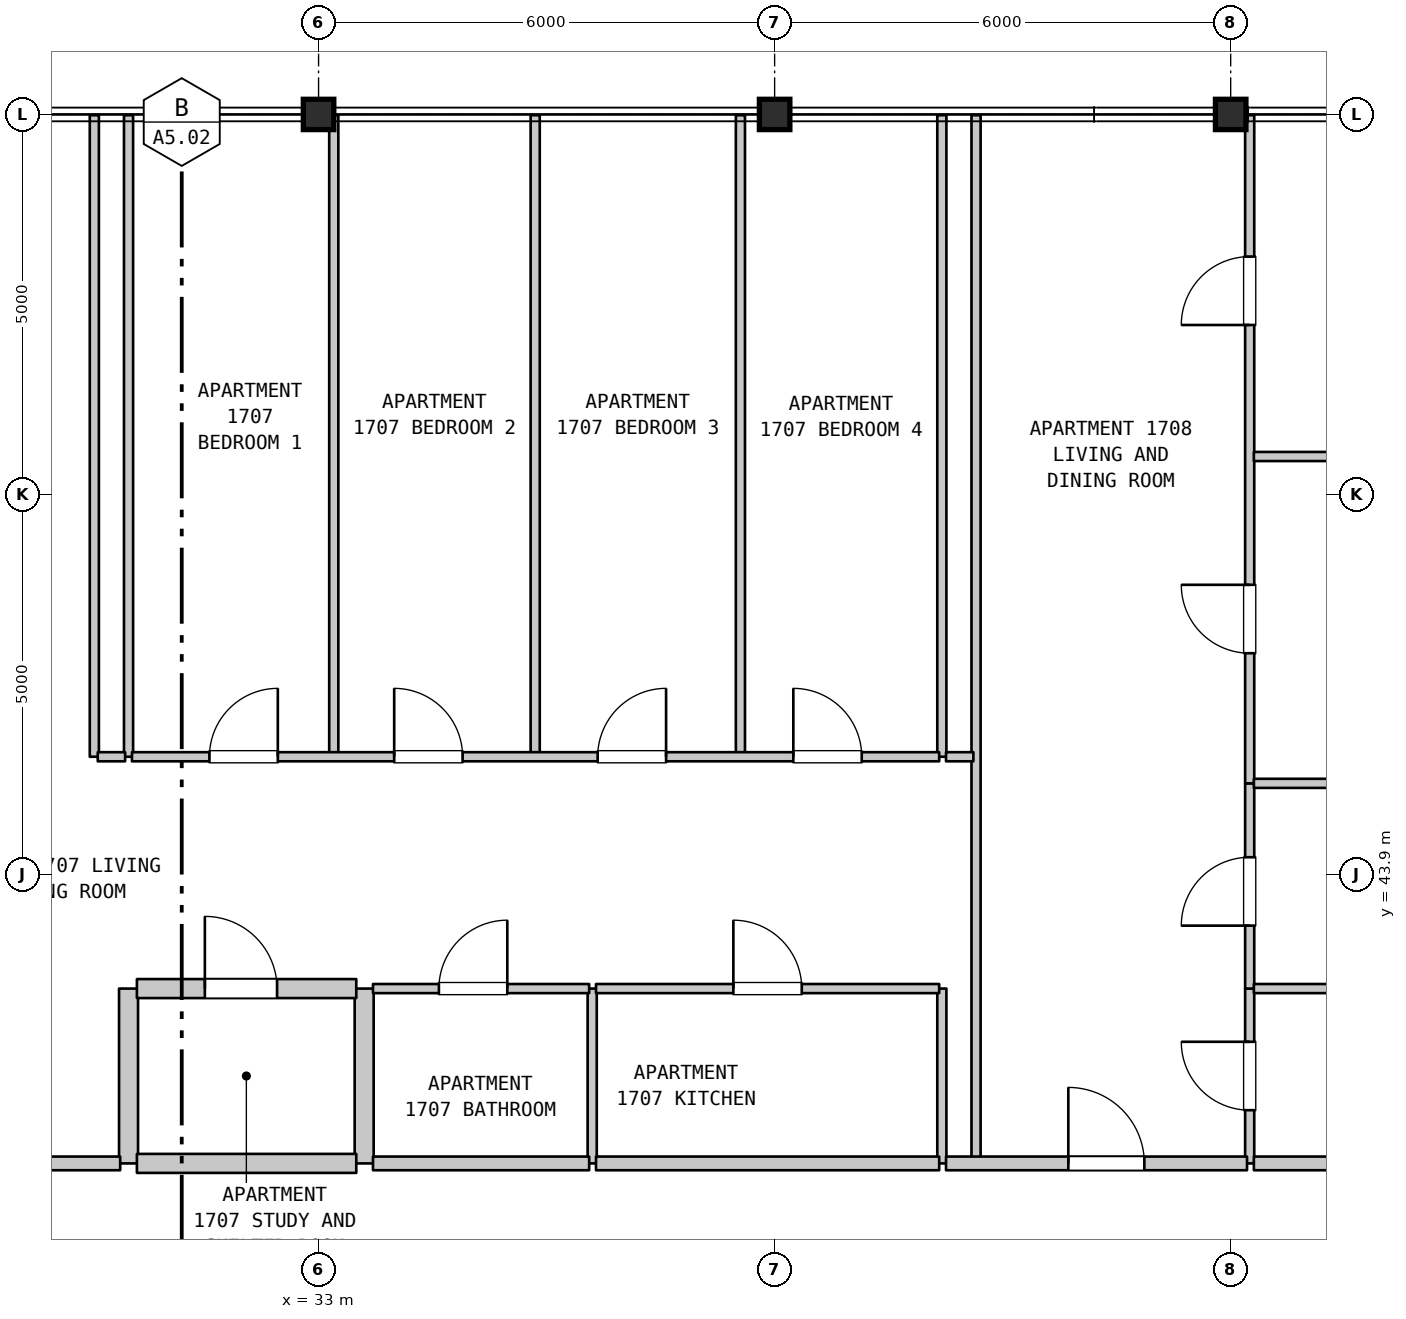
"""IFC4 building model, lengths in metres.
Left out: names, types, materials, properties, quantities, classifications, styles, units other than length and angle.
Written with IfcOpenShell. Run it as: python <this file> out.ifc"""

import sys

from ifc_helpers import new_model, si_unit, direction, frame, frame_2d, origin, origin_2d, place, context, subcontext, project, spatial, rectangle, i_section, extrude, element, fill, save


model = new_model("IFC4")
c1 = context("Model", 3, precision=1e-05, world=origin(), true_north=direction((0.0, 1.0)))
c2 = subcontext(c1, "Body", "Model", "MODEL_VIEW")
j1 = project(units=[si_unit("LENGTHUNIT", "METRE"), si_unit("PLANEANGLEUNIT", "RADIAN")], contexts=[c1])
p1 = place(None, origin())
s1 = spatial("IfcSite", under=j1, at=p1, CompositionType="ELEMENT")
p2 = place(p1, origin())
s2 = spatial("IfcBuilding", under=s1, at=p2, CompositionType="ELEMENT")
p3 = place(p2, frame((0.0, 0.0, 73.8)))
s3 = spatial("IfcBuildingStorey", under=s2, at=p3, CompositionType="ELEMENT", Elevation=73.8)
for number, where, z_axis, x_axis in (
    (1, (33.0, 53.9, 0.0), (0.0, 0.0, 1.0), (1.0, 0.0, 0.0)),
    (2, (39.0, 53.9, 0.0), (0.0, 0.0, 1.0), (1.0, 0.0, 0.0)),
    (3, (45.0, 53.9, 0.0), (0.0, 0.0, 1.0), (1.0, 0.0, 0.0)),
):
    element("IfcColumn", number, at=place(p3, frame(where, z_axis=z_axis, x_axis=x_axis)), inside=s3, PredefinedType="COLUMN", context=c2, shape_type="SweptSolid", body=[
        extrude(i_section(OverallWidth=0.401, OverallDepth=0.399, WebThickness=0.025, FlangeThickness=0.04, FilletRadius=0.015, at=origin_2d()), origin(), (0.0, 0.0, 1.0), 3.7),
    ])
p4 = place(p3, frame((30.05, 45.45, 0.0), z_axis=(0.0, 0.0, 1.0), x_axis=(0.0, 1.0, 0.0)))
e4 = element("IfcWall", 4, at=p4, inside=s3, PredefinedType="PARTITIONING", context=c2, shape_type="SweptSolid", body=[
    extrude(rectangle(XDim=8.44, YDim=0.12, at=frame_2d((4.22, 0.0))), origin(), (0.0, 0.0, 1.0), 3.385),
])
p5 = place(p3, frame((30.5, 40.1, 0.0), z_axis=(0.0, 0.0, 1.0), x_axis=(0.0, 1.0, 0.0)))
e5 = element("IfcWall", 5, at=p5, inside=s3, PredefinedType="STANDARD", context=c2, shape_type="SweptSolid", body=[
    extrude(rectangle(XDim=2.3, YDim=0.25, at=frame_2d((1.15, 0.0))), origin(), (0.0, 0.0, 1.0), 3.385),
])
for number, where, z_axis, x_axis in (
    (6, (30.5, 45.45, 0.0), (0.0, 0.0, 1.0), (0.0, 1.0, 0.0)),
    (7, (33.2, 45.45, 0.0), (0.0, 0.0, 1.0), (0.0, 1.0, 0.0)),
):
    element("IfcWall", number, at=place(p3, frame(where, z_axis=z_axis, x_axis=x_axis)), inside=s3, PredefinedType="PARTITIONING", context=c2, shape_type="SweptSolid", body=[
        extrude(rectangle(XDim=8.44, YDim=0.12, at=frame_2d((4.22, 0.0))), origin(), (0.0, 0.0, 1.0), 3.385),
    ])
p6 = place(p3, frame((33.6, 40.1, 0.0), z_axis=(0.0, 0.0, 1.0), x_axis=(0.0, 1.0, 0.0)))
e8 = element("IfcWall", 8, at=p6, inside=s3, PredefinedType="STANDARD", context=c2, shape_type="SweptSolid", body=[
    extrude(rectangle(XDim=2.3, YDim=0.25, at=frame_2d((1.15, 0.0))), origin(), (0.0, 0.0, 1.0), 3.385),
])
p7 = place(p3, frame((35.85, 45.45, 0.0), z_axis=(0.0, 0.0, 1.0), x_axis=(0.0, 1.0, 0.0)))
e9 = element("IfcWall", 9, at=p7, inside=s3, PredefinedType="PARTITIONING", context=c2, shape_type="SweptSolid", body=[
    extrude(rectangle(XDim=8.44, YDim=0.12, at=frame_2d((4.22, 0.0))), origin(), (0.0, 0.0, 1.0), 3.385),
])
p8 = place(p3, frame((36.6, 40.1, 0.0), z_axis=(0.0, 0.0, 1.0), x_axis=(0.0, 1.0, 0.0)))
e10 = element("IfcWall", 10, at=p8, inside=s3, PredefinedType="PARTITIONING", context=c2, shape_type="SweptSolid", body=[
    extrude(rectangle(XDim=2.3, YDim=0.12, at=frame_2d((1.15, 0.0))), origin(), (0.0, 0.0, 1.0), 3.385),
])
p9 = place(p3, frame((38.55, 45.45, 0.0), z_axis=(0.0, 0.0, 1.0), x_axis=(0.0, 1.0, 0.0)))
e11 = element("IfcWall", 11, at=p9, inside=s3, PredefinedType="PARTITIONING", context=c2, shape_type="SweptSolid", body=[
    extrude(rectangle(XDim=8.44, YDim=0.12, at=frame_2d((4.22, 0.0))), origin(), (0.0, 0.0, 1.0), 3.385),
])
p10 = place(p3, frame((41.2, 40.1, 0.0), z_axis=(0.0, 0.0, 1.0), x_axis=(0.0, 1.0, 0.0)))
e12 = element("IfcWall", 12, at=p10, inside=s3, PredefinedType="PARTITIONING", context=c2, shape_type="SweptSolid", body=[
    extrude(rectangle(XDim=2.3, YDim=0.12, at=frame_2d((1.15, 0.0))), origin(), (0.0, 0.0, 1.0), 3.385),
])
p11 = place(p3, frame((41.2, 45.45, 0.0), z_axis=(0.0, 0.0, 1.0), x_axis=(0.0, 1.0, 0.0)))
e13 = element("IfcWall", 13, at=p11, inside=s3, PredefinedType="PARTITIONING", context=c2, shape_type="SweptSolid", body=[
    extrude(rectangle(XDim=8.44, YDim=0.12, at=frame_2d((4.22, 0.0))), origin(), (0.0, 0.0, 1.0), 3.385),
])
p12 = place(p3, frame((41.65, 40.1, 0.0), z_axis=(0.0, 0.0, 1.0), x_axis=(0.0, 1.0, 0.0)))
e14 = element("IfcWall", 14, at=p12, inside=s3, PredefinedType="PARTITIONING", context=c2, shape_type="SweptSolid", body=[
    extrude(rectangle(XDim=13.79, YDim=0.12, at=frame_2d((6.895, 0.0))), origin(), (0.0, 0.0, 1.0), 3.385),
])
p13 = place(p3, frame((45.25, 40.1, 0.0), z_axis=(0.0, 0.0, 1.0), x_axis=(0.0, 1.0, 0.0)))
e15 = element("IfcWall", 15, at=p13, inside=s3, PredefinedType="PARTITIONING", context=c2, shape_type="SweptSolid", body=[
    extrude(rectangle(XDim=2.3, YDim=0.12, at=frame_2d((1.15, 0.0))), origin(), (0.0, 0.0, 1.0), 3.385),
])
p14 = place(p13, frame((0.7, 0.0, 0.0)))
e16 = element("IfcOpeningElement", 16, at=p14, cuts=e15, PredefinedType="OPENING", context=c2, shape_type="SweptSolid", body=[
    extrude(rectangle(XDim=0.9, YDim=2.15, at=frame_2d((0.45, 1.075))), frame((0.0, 0.07, 0.0), z_axis=(0.0, -1.0, 0.0), x_axis=(1.0, 0.0, 0.0)), (0.0, 0.0, 1.0), 0.14),
])
p15 = place(p3, frame((45.25, 42.4, 0.0), z_axis=(0.0, 0.0, 1.0), x_axis=(0.0, 1.0, 0.0)))
e17 = element("IfcWall", 17, at=p15, inside=s3, PredefinedType="PARTITIONING", context=c2, shape_type="SweptSolid", body=[
    extrude(rectangle(XDim=2.7, YDim=0.12, at=frame_2d((1.35, 0.0))), origin(), (0.0, 0.0, 1.0), 3.385),
])
p16 = place(p15, frame((0.828, 0.0, 0.0)))
e18 = element("IfcOpeningElement", 18, at=p16, cuts=e17, PredefinedType="OPENING", context=c2, shape_type="SweptSolid", body=[
    extrude(rectangle(XDim=0.9, YDim=2.1, at=frame_2d((0.45, 1.05))), frame((0.0, 0.07, 0.0), z_axis=(0.0, -1.0, 0.0), x_axis=(1.0, 0.0, 0.0)), (0.0, 0.0, 1.0), 0.14),
])
p17 = place(p3, frame((45.25, 45.1, 0.0), z_axis=(0.0, 0.0, 1.0), x_axis=(0.0, 1.0, 0.0)))
e19 = element("IfcWall", 19, at=p17, inside=s3, PredefinedType="PARTITIONING", context=c2, shape_type="SweptSolid", body=[
    extrude(rectangle(XDim=8.79, YDim=0.12, at=frame_2d((4.395, 0.0))), origin(), (0.0, 0.0, 1.0), 3.385),
])
p18 = place(p17, frame((1.712, 0.0, 0.0)))
e20 = element("IfcOpeningElement", 20, at=p18, cuts=e19, PredefinedType="OPENING", context=c2, shape_type="SweptSolid", body=[
    extrude(rectangle(XDim=0.9, YDim=2.15, at=frame_2d((0.45, 1.075))), frame((0.0, 0.07, 0.0), z_axis=(0.0, -1.0, 0.0), x_axis=(1.0, 0.0, 0.0)), (0.0, 0.0, 1.0), 0.14),
])
p19 = place(p17, frame((6.03, 0.0, 0.0)))
e21 = element("IfcOpeningElement", 21, at=p19, cuts=e19, PredefinedType="OPENING", context=c2, shape_type="SweptSolid", body=[
    extrude(rectangle(XDim=0.9, YDim=2.15, at=frame_2d((0.45, 1.075))), frame((0.0, 0.07, 0.0), z_axis=(0.0, -1.0, 0.0), x_axis=(1.0, 0.0, 0.0)), (0.0, 0.0, 1.0), 0.14),
])
p20 = place(p3, frame((20.045, 40.1, 0.0), z_axis=(0.0, 0.0, 1.0), x_axis=(1.0, 0.0, 0.0)))
e22 = element("IfcWall", 22, at=p20, inside=s3, PredefinedType="STANDARD", context=c2, shape_type="SweptSolid", body=[
    extrude(rectangle(XDim=10.345, YDim=0.18, at=frame_2d((5.172, 0.0))), origin(), (0.0, 0.0, 1.0), 3.385),
])
p21 = place(p20, frame((2.035, 0.0, 0.0)))
e23 = element("IfcOpeningElement", 23, at=p21, cuts=e22, PredefinedType="OPENING", context=c2, shape_type="SweptSolid", body=[
    extrude(rectangle(XDim=1.0, YDim=2.15, at=frame_2d((0.5, 1.075))), frame((0.0, 0.1, 0.0), z_axis=(0.0, -1.0, 0.0), x_axis=(1.0, 0.0, 0.0)), (0.0, 0.0, 1.0), 0.2),
])
p22 = place(p20, frame((7.235, 0.0, 0.0)))
e24 = element("IfcOpeningElement", 24, at=p22, cuts=e22, PredefinedType="OPENING", context=c2, shape_type="SweptSolid", body=[
    extrude(rectangle(XDim=1.0, YDim=2.15, at=frame_2d((0.5, 1.075))), frame((0.0, 0.1, 0.0), z_axis=(0.0, -1.0, 0.0), x_axis=(1.0, 0.0, 0.0)), (0.0, 0.0, 1.0), 0.2),
])
p23 = place(p3, frame((30.61, 40.1, 0.0), z_axis=(0.0, 0.0, 1.0), x_axis=(1.0, 0.0, 0.0)))
e25 = element("IfcWall", 25, at=p23, inside=s3, PredefinedType="STANDARD", context=c2, shape_type="SweptSolid", body=[
    extrude(rectangle(XDim=2.886, YDim=0.25, at=frame_2d((1.443, 0.0))), origin(), (0.0, 0.0, 1.0), 3.385),
])
p24 = place(p3, frame((33.716, 40.1, 0.0), z_axis=(0.0, 0.0, 1.0), x_axis=(1.0, 0.0, 0.0)))
e26 = element("IfcWall", 26, at=p24, inside=s3, PredefinedType="STANDARD", context=c2, shape_type="SweptSolid", body=[
    extrude(rectangle(XDim=2.844, YDim=0.18, at=frame_2d((1.422, 0.0))), origin(), (0.0, 0.0, 1.0), 3.385),
])
p25 = place(p3, frame((36.65, 40.1, 0.0), z_axis=(0.0, 0.0, 1.0), x_axis=(1.0, 0.0, 0.0)))
e27 = element("IfcWall", 27, at=p25, inside=s3, PredefinedType="STANDARD", context=c2, shape_type="SweptSolid", body=[
    extrude(rectangle(XDim=4.515, YDim=0.18, at=frame_2d((2.258, 0.0))), origin(), (0.0, 0.0, 1.0), 3.385),
])
p26 = place(p3, frame((41.255, 40.1, 0.0), z_axis=(0.0, 0.0, 1.0), x_axis=(1.0, 0.0, 0.0)))
e28 = element("IfcWall", 28, at=p26, inside=s3, PredefinedType="STANDARD", context=c2, shape_type="SweptSolid", body=[
    extrude(rectangle(XDim=3.96, YDim=0.18, at=frame_2d((1.98, 0.0))), origin(), (0.0, 0.0, 1.0), 3.385),
])
p27 = place(p26, frame((1.609, 0.0, 0.0)))
e29 = element("IfcOpeningElement", 29, at=p27, cuts=e28, PredefinedType="OPENING", context=c2, shape_type="SweptSolid", body=[
    extrude(rectangle(XDim=1.0, YDim=2.15, at=frame_2d((0.5, 1.075))), frame((0.0, 0.1, 0.0), z_axis=(0.0, -1.0, 0.0), x_axis=(1.0, 0.0, 0.0)), (0.0, 0.0, 1.0), 0.2),
])
p28 = place(p3, frame((45.305, 40.1, 0.0), z_axis=(0.0, 0.0, 1.0), x_axis=(1.0, 0.0, 0.0)))
e30 = element("IfcWall", 30, at=p28, inside=s3, PredefinedType="STANDARD", context=c2, shape_type="SweptSolid", body=[
    extrude(rectangle(XDim=6.1, YDim=0.18, at=frame_2d((3.05, 0.0))), origin(), (0.0, 0.0, 1.0), 3.385),
])
p29 = place(p3, frame((30.61, 42.4, 0.0), z_axis=(0.0, 0.0, 1.0), x_axis=(1.0, 0.0, 0.0)))
e31 = element("IfcWall", 31, at=p29, inside=s3, PredefinedType="STANDARD", context=c2, shape_type="SweptSolid", body=[
    extrude(rectangle(XDim=2.886, YDim=0.25, at=frame_2d((1.443, 0.0))), origin(), (0.0, 0.0, 1.0), 3.385),
])
p30 = place(p29, frame((0.894, 0.0, 0.0)))
e32 = element("IfcOpeningElement", 32, at=p30, cuts=e31, PredefinedType="OPENING", context=c2, shape_type="SweptSolid", body=[
    extrude(rectangle(XDim=0.95, YDim=2.15, at=frame_2d((0.475, 1.075))), frame((0.0, 0.135, 0.0), z_axis=(0.0, -1.0, 0.0), x_axis=(1.0, 0.0, 0.0)), (0.0, 0.0, 1.0), 0.27),
])
p31 = place(p3, frame((33.716, 42.4, 0.0), z_axis=(0.0, 0.0, 1.0), x_axis=(1.0, 0.0, 0.0)))
e33 = element("IfcWall", 33, at=p31, inside=s3, PredefinedType="PARTITIONING", context=c2, shape_type="SweptSolid", body=[
    extrude(rectangle(XDim=2.844, YDim=0.12, at=frame_2d((1.422, 0.0))), origin(), (0.0, 0.0, 1.0), 3.385),
])
p32 = place(p31, frame((0.867, 0.0, 0.0)))
e34 = element("IfcOpeningElement", 34, at=p32, cuts=e33, PredefinedType="OPENING", context=c2, shape_type="SweptSolid", body=[
    extrude(rectangle(XDim=0.9, YDim=2.1, at=frame_2d((0.45, 1.05))), frame((0.0, 0.07, 0.0), z_axis=(0.0, -1.0, 0.0), x_axis=(1.0, 0.0, 0.0)), (0.0, 0.0, 1.0), 0.14),
])
p33 = place(p3, frame((36.65, 42.4, 0.0), z_axis=(0.0, 0.0, 1.0), x_axis=(1.0, 0.0, 0.0)))
e35 = element("IfcWall", 35, at=p33, inside=s3, PredefinedType="PARTITIONING", context=c2, shape_type="SweptSolid", body=[
    extrude(rectangle(XDim=4.515, YDim=0.12, at=frame_2d((2.258, 0.0))), origin(), (0.0, 0.0, 1.0), 3.385),
])
p34 = place(p33, frame((1.807, 0.0, 0.0)))
e36 = element("IfcOpeningElement", 36, at=p34, cuts=e35, PredefinedType="OPENING", context=c2, shape_type="SweptSolid", body=[
    extrude(rectangle(XDim=0.9, YDim=2.15, at=frame_2d((0.45, 1.075))), frame((0.0, 0.07, 0.0), z_axis=(0.0, -1.0, 0.0), x_axis=(1.0, 0.0, 0.0)), (0.0, 0.0, 1.0), 0.14),
])
for number, where, z_axis, x_axis in (
    (37, (45.305, 42.4, 0.0), (0.0, 0.0, 1.0), (1.0, 0.0, 0.0)),
    (38, (45.305, 45.1, 0.0), (0.0, 0.0, 1.0), (1.0, 0.0, 0.0)),
):
    element("IfcWall", number, at=place(p3, frame(where, z_axis=z_axis, x_axis=x_axis)), inside=s3, PredefinedType="PARTITIONING", context=c2, shape_type="SweptSolid", body=[
        extrude(rectangle(XDim=6.1, YDim=0.12, at=frame_2d((3.05, 0.0))), origin(), (0.0, 0.0, 1.0), 3.385),
    ])
p35 = place(p3, frame((30.095, 45.45, 0.0), z_axis=(0.0, 0.0, 1.0), x_axis=(1.0, 0.0, 0.0)))
e39 = element("IfcWall", 39, at=p35, inside=s3, PredefinedType="PARTITIONING", context=c2, shape_type="SweptSolid", body=[
    extrude(rectangle(XDim=0.36, YDim=0.12, at=frame_2d((0.18, 0.0))), origin(), (0.0, 0.0, 1.0), 3.385),
])
p36 = place(p3, frame((30.545, 45.45, 0.0), z_axis=(0.0, 0.0, 1.0), x_axis=(1.0, 0.0, 0.0)))
e40 = element("IfcWall", 40, at=p36, inside=s3, PredefinedType="PARTITIONING", context=c2, shape_type="SweptSolid", body=[
    extrude(rectangle(XDim=10.62, YDim=0.12, at=frame_2d((5.31, 0.0))), origin(), (0.0, 0.0, 1.0), 3.385),
])
p37 = place(p36, frame((1.019, 0.0, 0.0)))
e41 = element("IfcOpeningElement", 41, at=p37, cuts=e40, PredefinedType="OPENING", context=c2, shape_type="SweptSolid", body=[
    extrude(rectangle(XDim=0.9, YDim=2.15, at=frame_2d((0.45, 1.075))), frame((0.0, 0.07, 0.0), z_axis=(0.0, -1.0, 0.0), x_axis=(1.0, 0.0, 0.0)), (0.0, 0.0, 1.0), 0.14),
])
p38 = place(p36, frame((3.45, 0.0, 0.0)))
e42 = element("IfcOpeningElement", 42, at=p38, cuts=e40, PredefinedType="OPENING", context=c2, shape_type="SweptSolid", body=[
    extrude(rectangle(XDim=0.9, YDim=2.15, at=frame_2d((0.45, 1.075))), frame((0.0, 0.07, 0.0), z_axis=(0.0, -1.0, 0.0), x_axis=(1.0, 0.0, 0.0)), (0.0, 0.0, 1.0), 0.14),
])
p39 = place(p36, frame((6.127, 0.0, 0.0)))
e43 = element("IfcOpeningElement", 43, at=p39, cuts=e40, PredefinedType="OPENING", context=c2, shape_type="SweptSolid", body=[
    extrude(rectangle(XDim=0.9, YDim=2.15, at=frame_2d((0.45, 1.075))), frame((0.0, 0.07, 0.0), z_axis=(0.0, -1.0, 0.0), x_axis=(1.0, 0.0, 0.0)), (0.0, 0.0, 1.0), 0.14),
])
p40 = place(p36, frame((8.701, 0.0, 0.0)))
e44 = element("IfcOpeningElement", 44, at=p40, cuts=e40, PredefinedType="OPENING", context=c2, shape_type="SweptSolid", body=[
    extrude(rectangle(XDim=0.9, YDim=2.15, at=frame_2d((0.45, 1.075))), frame((0.0, 0.07, 0.0), z_axis=(0.0, -1.0, 0.0), x_axis=(1.0, 0.0, 0.0)), (0.0, 0.0, 1.0), 0.14),
])
p41 = place(p3, frame((41.255, 45.45, 0.0), z_axis=(0.0, 0.0, 1.0), x_axis=(1.0, 0.0, 0.0)))
e45 = element("IfcWall", 45, at=p41, inside=s3, PredefinedType="PARTITIONING", context=c2, shape_type="SweptSolid", body=[
    extrude(rectangle(XDim=0.36, YDim=0.12, at=frame_2d((0.18, 0.0))), origin(), (0.0, 0.0, 1.0), 3.385),
])
p42 = place(p3, frame((45.305, 49.4, 0.0), z_axis=(0.0, 0.0, 1.0), x_axis=(1.0, 0.0, 0.0)))
e46 = element("IfcWall", 46, at=p42, inside=s3, PredefinedType="PARTITIONING", context=c2, shape_type="SweptSolid", body=[
    extrude(rectangle(XDim=6.1, YDim=0.12, at=frame_2d((3.05, 0.0))), origin(), (0.0, 0.0, 1.0), 3.385),
])
p43 = place(p14, origin())
e47 = element("IfcDoor", 47, at=p43, inside=s3, OperationType="SINGLE_SWING_RIGHT", PredefinedType="DOOR", context=c2, shape_type="SweptSolid", body=[
    extrude(rectangle(XDim=0.9, YDim=2.15, at=frame_2d((0.45, 1.075))), frame((0.0, 0.025, 0.0), z_axis=(0.0, -1.0, 0.0), x_axis=(1.0, 0.0, 0.0)), (0.0, 0.0, 1.0), 0.05),
])
fill(e16, e47)
p44 = place(p16, origin())
e48 = element("IfcDoor", 48, at=p44, inside=s3, OperationType="SINGLE_SWING_LEFT", PredefinedType="DOOR", context=c2, shape_type="SweptSolid", body=[
    extrude(rectangle(XDim=0.9, YDim=2.1, at=frame_2d((0.45, 1.05))), frame((0.0, 0.025, 0.0), z_axis=(0.0, -1.0, 0.0), x_axis=(1.0, 0.0, 0.0)), (0.0, 0.0, 1.0), 0.05),
])
fill(e18, e48)
p45 = place(p18, origin())
e49 = element("IfcDoor", 49, at=p45, inside=s3, OperationType="SINGLE_SWING_RIGHT", PredefinedType="DOOR", context=c2, shape_type="SweptSolid", body=[
    extrude(rectangle(XDim=0.9, YDim=2.15, at=frame_2d((0.45, 1.075))), frame((0.0, 0.025, 0.0), z_axis=(0.0, -1.0, 0.0), x_axis=(1.0, 0.0, 0.0)), (0.0, 0.0, 1.0), 0.05),
])
fill(e20, e49)
p46 = place(p19, origin())
e50 = element("IfcDoor", 50, at=p46, inside=s3, OperationType="SINGLE_SWING_LEFT", PredefinedType="DOOR", context=c2, shape_type="SweptSolid", body=[
    extrude(rectangle(XDim=0.9, YDim=2.15, at=frame_2d((0.45, 1.075))), frame((0.0, 0.025, 0.0), z_axis=(0.0, -1.0, 0.0), x_axis=(1.0, 0.0, 0.0)), (0.0, 0.0, 1.0), 0.05),
])
fill(e21, e50)
p47 = place(p27, origin())
e51 = element("IfcDoor", 51, at=p47, inside=s3, OperationType="SINGLE_SWING_LEFT", PredefinedType="DOOR", context=c2, shape_type="SweptSolid", body=[
    extrude(rectangle(XDim=1.0, YDim=2.15, at=frame_2d((0.5, 1.075))), frame((0.0, 0.025, 0.0), z_axis=(0.0, -1.0, 0.0), x_axis=(1.0, 0.0, 0.0)), (0.0, 0.0, 1.0), 0.05),
])
fill(e29, e51)
p48 = place(p30, origin())
e52 = element("IfcDoor", 52, at=p48, inside=s3, OperationType="SINGLE_SWING_LEFT", PredefinedType="DOOR", context=c2, shape_type="SweptSolid", body=[
    extrude(rectangle(XDim=0.95, YDim=2.15, at=frame_2d((0.475, 1.075))), frame((0.0, 0.025, 0.0), z_axis=(0.0, -1.0, 0.0), x_axis=(1.0, 0.0, 0.0)), (0.0, 0.0, 1.0), 0.05),
])
fill(e32, e52)
p49 = place(p32, origin())
e53 = element("IfcDoor", 53, at=p49, inside=s3, OperationType="SINGLE_SWING_RIGHT", PredefinedType="DOOR", context=c2, shape_type="SweptSolid", body=[
    extrude(rectangle(XDim=0.9, YDim=2.1, at=frame_2d((0.45, 1.05))), frame((0.0, 0.025, 0.0), z_axis=(0.0, -1.0, 0.0), x_axis=(1.0, 0.0, 0.0)), (0.0, 0.0, 1.0), 0.05),
])
fill(e34, e53)
p50 = place(p34, origin())
e54 = element("IfcDoor", 54, at=p50, inside=s3, OperationType="SINGLE_SWING_LEFT", PredefinedType="DOOR", context=c2, shape_type="SweptSolid", body=[
    extrude(rectangle(XDim=0.9, YDim=2.15, at=frame_2d((0.45, 1.075))), frame((0.0, 0.025, 0.0), z_axis=(0.0, -1.0, 0.0), x_axis=(1.0, 0.0, 0.0)), (0.0, 0.0, 1.0), 0.05),
])
fill(e36, e54)
p51 = place(p37, origin())
e55 = element("IfcDoor", 55, at=p51, inside=s3, OperationType="SINGLE_SWING_RIGHT", PredefinedType="DOOR", context=c2, shape_type="SweptSolid", body=[
    extrude(rectangle(XDim=0.9, YDim=2.15, at=frame_2d((0.45, 1.075))), frame((0.0, 0.025, 0.0), z_axis=(0.0, -1.0, 0.0), x_axis=(1.0, 0.0, 0.0)), (0.0, 0.0, 1.0), 0.05),
])
fill(e41, e55)
p52 = place(p38, origin())
e56 = element("IfcDoor", 56, at=p52, inside=s3, OperationType="SINGLE_SWING_LEFT", PredefinedType="DOOR", context=c2, shape_type="SweptSolid", body=[
    extrude(rectangle(XDim=0.9, YDim=2.15, at=frame_2d((0.45, 1.075))), frame((0.0, 0.025, 0.0), z_axis=(0.0, -1.0, 0.0), x_axis=(1.0, 0.0, 0.0)), (0.0, 0.0, 1.0), 0.05),
])
fill(e42, e56)
p53 = place(p39, origin())
e57 = element("IfcDoor", 57, at=p53, inside=s3, OperationType="SINGLE_SWING_RIGHT", PredefinedType="DOOR", context=c2, shape_type="SweptSolid", body=[
    extrude(rectangle(XDim=0.9, YDim=2.15, at=frame_2d((0.45, 1.075))), frame((0.0, 0.025, 0.0), z_axis=(0.0, -1.0, 0.0), x_axis=(1.0, 0.0, 0.0)), (0.0, 0.0, 1.0), 0.05),
])
fill(e43, e57)
p54 = place(p40, origin())
e58 = element("IfcDoor", 58, at=p54, inside=s3, OperationType="SINGLE_SWING_LEFT", PredefinedType="DOOR", context=c2, shape_type="SweptSolid", body=[
    extrude(rectangle(XDim=0.9, YDim=2.15, at=frame_2d((0.45, 1.075))), frame((0.0, 0.025, 0.0), z_axis=(0.0, -1.0, 0.0), x_axis=(1.0, 0.0, 0.0)), (0.0, 0.0, 1.0), 0.05),
])
fill(e44, e58)
save(model, sys.argv[1])
